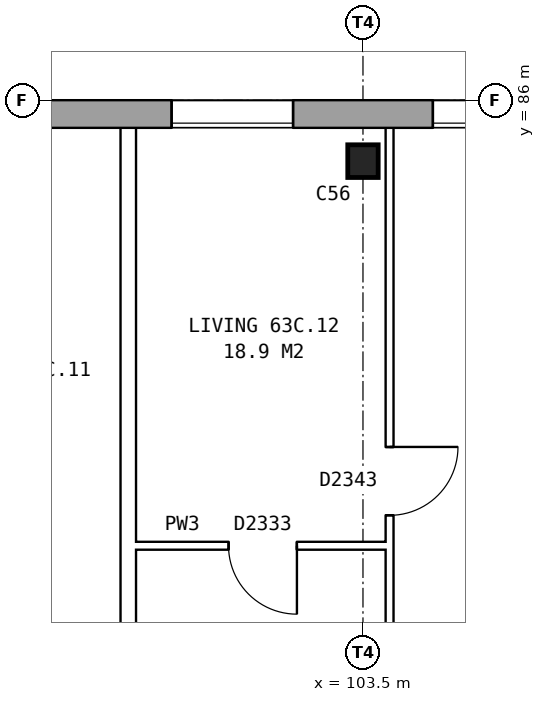
"""IFC4 building model, lengths in metres.
Left out: names, types, materials, properties, quantities, classifications, styles, units other than length and angle.
Written with IfcOpenShell. Run it as: python <this file> out.ifc"""

import sys

from ifc_helpers import new_model, si_unit, direction, frame, frame_2d, origin, origin_2d, place, context, subcontext, project, spatial, rectangle, i_section, extrude, element, fill, save


model = new_model("IFC4")
c1 = context("Model", 3, precision=1e-05, world=origin(), true_north=direction((0.0, 1.0)))
c2 = subcontext(c1, "Body", "Model", "MODEL_VIEW")
j1 = project(units=[si_unit("LENGTHUNIT", "METRE"), si_unit("PLANEANGLEUNIT", "RADIAN")], contexts=[c1])
p1 = place(None, origin())
s1 = spatial("IfcSite", under=j1, at=p1, CompositionType="ELEMENT")
p2 = place(p1, origin())
s2 = spatial("IfcBuilding", under=s1, at=p2, CompositionType="ELEMENT")
p3 = place(p2, frame((0.0, 0.0, 224.5)))
s3 = spatial("IfcBuildingStorey", under=s2, at=p3, CompositionType="ELEMENT", Elevation=224.5)
p4 = place(p3, frame((103.5, 85.2, 0.0), z_axis=(0.0, 0.0, 1.0), x_axis=(1.0, 0.0, 0.0)))
e1 = element("IfcColumn", 1, at=p4, inside=s3, PredefinedType="COLUMN", context=c2, shape_type="SweptSolid", body=[
    extrude(i_section(OverallWidth=0.4, OverallDepth=0.43, WebThickness=0.04, FlangeThickness=0.04, at=origin_2d()), origin(), (0.0, 0.0, 1.0), 2.85),
])
p5 = place(p3, frame((131.05, 85.82, 0.0), z_axis=(0.0, 0.0, 1.0), x_axis=(-1.0, 0.0, 0.0)))
e2 = element("IfcWall", 2, at=p5, inside=s3, PredefinedType="STANDARD", context=c2, shape_type="SweptSolid", body=[
    extrude(rectangle(XDim=55.1, YDim=0.36, at=frame_2d((27.55, 0.0))), origin(), (0.0, 0.0, 1.0), 2.85),
])
p6 = place(p5, frame((0.969, 0.0, 0.8)))
e3 = element("IfcOpeningElement", 3, at=p6, cuts=e2, PredefinedType="OPENING", context=c2, shape_type="SweptSolid", body=[
    extrude(rectangle(XDim=1.6, YDim=1.8, at=frame_2d((0.8, 0.9))), frame((0.0, 0.19, 0.0), z_axis=(0.0, -1.0, 0.0), x_axis=(1.0, 0.0, 0.0)), (0.0, 0.0, 1.0), 0.38),
])
p7 = place(p5, frame((4.406, 0.0, 0.8)))
e4 = element("IfcOpeningElement", 4, at=p7, cuts=e2, PredefinedType="OPENING", context=c2, shape_type="SweptSolid", body=[
    extrude(rectangle(XDim=1.6, YDim=1.8, at=frame_2d((0.8, 0.9))), frame((0.0, 0.19, 0.0), z_axis=(0.0, -1.0, 0.0), x_axis=(1.0, 0.0, 0.0)), (0.0, 0.0, 1.0), 0.38),
])
p8 = place(p5, frame((7.844, 0.0, 0.8)))
e5 = element("IfcOpeningElement", 5, at=p8, cuts=e2, PredefinedType="OPENING", context=c2, shape_type="SweptSolid", body=[
    extrude(rectangle(XDim=1.6, YDim=1.8, at=frame_2d((0.8, 0.9))), frame((0.0, 0.19, 0.0), z_axis=(0.0, -1.0, 0.0), x_axis=(1.0, 0.0, 0.0)), (0.0, 0.0, 1.0), 0.38),
])
p9 = place(p5, frame((11.281, 0.0, 0.8)))
e6 = element("IfcOpeningElement", 6, at=p9, cuts=e2, PredefinedType="OPENING", context=c2, shape_type="SweptSolid", body=[
    extrude(rectangle(XDim=1.6, YDim=1.8, at=frame_2d((0.8, 0.9))), frame((0.0, 0.19, 0.0), z_axis=(0.0, -1.0, 0.0), x_axis=(1.0, 0.0, 0.0)), (0.0, 0.0, 1.0), 0.38),
])
p10 = place(p5, frame((14.719, 0.0, 0.8)))
e7 = element("IfcOpeningElement", 7, at=p10, cuts=e2, PredefinedType="OPENING", context=c2, shape_type="SweptSolid", body=[
    extrude(rectangle(XDim=1.6, YDim=1.8, at=frame_2d((0.8, 0.9))), frame((0.0, 0.19, 0.0), z_axis=(0.0, -1.0, 0.0), x_axis=(1.0, 0.0, 0.0)), (0.0, 0.0, 1.0), 0.38),
])
p11 = place(p5, frame((18.156, 0.0, 0.8)))
e8 = element("IfcOpeningElement", 8, at=p11, cuts=e2, PredefinedType="OPENING", context=c2, shape_type="SweptSolid", body=[
    extrude(rectangle(XDim=1.6, YDim=1.8, at=frame_2d((0.8, 0.9))), frame((0.0, 0.19, 0.0), z_axis=(0.0, -1.0, 0.0), x_axis=(1.0, 0.0, 0.0)), (0.0, 0.0, 1.0), 0.38),
])
p12 = place(p5, frame((21.594, 0.0, 0.8)))
e9 = element("IfcOpeningElement", 9, at=p12, cuts=e2, PredefinedType="OPENING", context=c2, shape_type="SweptSolid", body=[
    extrude(rectangle(XDim=1.6, YDim=1.8, at=frame_2d((0.8, 0.9))), frame((0.0, 0.19, 0.0), z_axis=(0.0, -1.0, 0.0), x_axis=(1.0, 0.0, 0.0)), (0.0, 0.0, 1.0), 0.38),
])
p13 = place(p5, frame((25.031, 0.0, 0.8)))
e10 = element("IfcOpeningElement", 10, at=p13, cuts=e2, PredefinedType="OPENING", context=c2, shape_type="SweptSolid", body=[
    extrude(rectangle(XDim=1.6, YDim=1.8, at=frame_2d((0.8, 0.9))), frame((0.0, 0.19, 0.0), z_axis=(0.0, -1.0, 0.0), x_axis=(1.0, 0.0, 0.0)), (0.0, 0.0, 1.0), 0.38),
])
p14 = place(p5, frame((28.469, 0.0, 0.8)))
e11 = element("IfcOpeningElement", 11, at=p14, cuts=e2, PredefinedType="OPENING", context=c2, shape_type="SweptSolid", body=[
    extrude(rectangle(XDim=1.6, YDim=1.8, at=frame_2d((0.8, 0.9))), frame((0.0, 0.19, 0.0), z_axis=(0.0, -1.0, 0.0), x_axis=(1.0, 0.0, 0.0)), (0.0, 0.0, 1.0), 0.38),
])
p15 = place(p5, frame((31.906, 0.0, 0.8)))
e12 = element("IfcOpeningElement", 12, at=p15, cuts=e2, PredefinedType="OPENING", context=c2, shape_type="SweptSolid", body=[
    extrude(rectangle(XDim=1.6, YDim=1.8, at=frame_2d((0.8, 0.9))), frame((0.0, 0.19, 0.0), z_axis=(0.0, -1.0, 0.0), x_axis=(1.0, 0.0, 0.0)), (0.0, 0.0, 1.0), 0.38),
])
p16 = place(p5, frame((35.344, 0.0, 0.8)))
e13 = element("IfcOpeningElement", 13, at=p16, cuts=e2, PredefinedType="OPENING", context=c2, shape_type="SweptSolid", body=[
    extrude(rectangle(XDim=1.6, YDim=1.8, at=frame_2d((0.8, 0.9))), frame((0.0, 0.19, 0.0), z_axis=(0.0, -1.0, 0.0), x_axis=(1.0, 0.0, 0.0)), (0.0, 0.0, 1.0), 0.38),
])
p17 = place(p5, frame((38.781, 0.0, 0.8)))
e14 = element("IfcOpeningElement", 14, at=p17, cuts=e2, PredefinedType="OPENING", context=c2, shape_type="SweptSolid", body=[
    extrude(rectangle(XDim=1.6, YDim=1.8, at=frame_2d((0.8, 0.9))), frame((0.0, 0.19, 0.0), z_axis=(0.0, -1.0, 0.0), x_axis=(1.0, 0.0, 0.0)), (0.0, 0.0, 1.0), 0.38),
])
p18 = place(p5, frame((42.219, 0.0, 0.8)))
e15 = element("IfcOpeningElement", 15, at=p18, cuts=e2, PredefinedType="OPENING", context=c2, shape_type="SweptSolid", body=[
    extrude(rectangle(XDim=1.6, YDim=1.8, at=frame_2d((0.8, 0.9))), frame((0.0, 0.19, 0.0), z_axis=(0.0, -1.0, 0.0), x_axis=(1.0, 0.0, 0.0)), (0.0, 0.0, 1.0), 0.38),
])
p19 = place(p5, frame((45.656, 0.0, 0.8)))
e16 = element("IfcOpeningElement", 16, at=p19, cuts=e2, PredefinedType="OPENING", context=c2, shape_type="SweptSolid", body=[
    extrude(rectangle(XDim=1.6, YDim=1.8, at=frame_2d((0.8, 0.9))), frame((0.0, 0.19, 0.0), z_axis=(0.0, -1.0, 0.0), x_axis=(1.0, 0.0, 0.0)), (0.0, 0.0, 1.0), 0.38),
])
p20 = place(p5, frame((49.094, 0.0, 0.8)))
e17 = element("IfcOpeningElement", 17, at=p20, cuts=e2, PredefinedType="OPENING", context=c2, shape_type="SweptSolid", body=[
    extrude(rectangle(XDim=1.6, YDim=1.8, at=frame_2d((0.8, 0.9))), frame((0.0, 0.19, 0.0), z_axis=(0.0, -1.0, 0.0), x_axis=(1.0, 0.0, 0.0)), (0.0, 0.0, 1.0), 0.38),
])
p21 = place(p5, frame((52.531, 0.0, 0.8)))
e18 = element("IfcOpeningElement", 18, at=p21, cuts=e2, PredefinedType="OPENING", context=c2, shape_type="SweptSolid", body=[
    extrude(rectangle(XDim=1.6, YDim=1.8, at=frame_2d((0.8, 0.9))), frame((0.0, 0.19, 0.0), z_axis=(0.0, -1.0, 0.0), x_axis=(1.0, 0.0, 0.0)), (0.0, 0.0, 1.0), 0.38),
])
p22 = place(p3, frame((100.512, 80.14, 0.0), z_axis=(0.0, 0.0, 1.0), x_axis=(1.0, 0.0, 0.0)))
e19 = element("IfcWall", 19, at=p22, inside=s3, PredefinedType="PARTITIONING", context=c2, shape_type="SweptSolid", body=[
    extrude(rectangle(XDim=3.338, YDim=0.1, at=frame_2d((1.669, 0.0))), origin(), (0.0, 0.0, 1.0), 2.85),
])
p23 = place(p22, frame((1.219, 0.0, 0.0)))
e20 = element("IfcOpeningElement", 20, at=p23, cuts=e19, PredefinedType="OPENING", context=c2, shape_type="SweptSolid", body=[
    extrude(rectangle(XDim=0.9, YDim=2.1, at=frame_2d((0.45, 1.05))), frame((0.0, 0.06, 0.0), z_axis=(0.0, -1.0, 0.0), x_axis=(1.0, 0.0, 0.0)), (0.0, 0.0, 1.0), 0.12),
])
p24 = place(p3, frame((100.412, 71.3, 0.0), z_axis=(0.0, 0.0, 1.0), x_axis=(0.0, 1.0, 0.0)))
e21 = element("IfcWall", 21, at=p24, inside=s3, PredefinedType="PARTITIONING", context=c2, shape_type="SweptSolid", body=[
    extrude(rectangle(XDim=14.34, YDim=0.2, at=frame_2d((7.17, 0.0))), origin(), (0.0, 0.0, 1.0), 2.85),
])
p25 = place(p3, frame((103.85, 71.3, 0.0), z_axis=(0.0, 0.0, 1.0), x_axis=(0.0, 1.0, 0.0)))
e22 = element("IfcWall", 22, at=p25, inside=s3, PredefinedType="PARTITIONING", context=c2, shape_type="SweptSolid", body=[
    extrude(rectangle(XDim=14.34, YDim=0.1, at=frame_2d((7.17, 0.0))), origin(), (0.0, 0.0, 1.0), 2.85),
])
p26 = place(p25, frame((9.24, 0.0, 0.0)))
e23 = element("IfcOpeningElement", 23, at=p26, cuts=e22, PredefinedType="OPENING", context=c2, shape_type="SweptSolid", body=[
    extrude(rectangle(XDim=0.9, YDim=2.1, at=frame_2d((0.45, 1.05))), frame((0.0, 0.06, 0.0), z_axis=(0.0, -1.0, 0.0), x_axis=(1.0, 0.0, 0.0)), (0.0, 0.0, 1.0), 0.12),
])
p27 = place(p25, frame((0.4, 0.0, 0.0)))
e24 = element("IfcOpeningElement", 24, at=p27, cuts=e22, PredefinedType="OPENING", context=c2, shape_type="SweptSolid", body=[
    extrude(rectangle(XDim=0.9, YDim=2.1, at=frame_2d((0.45, 1.05))), frame((0.0, 0.06, 0.0), z_axis=(0.0, -1.0, 0.0), x_axis=(1.0, 0.0, 0.0)), (0.0, 0.0, 1.0), 0.12),
])
p28 = place(p13, origin())
e25 = element("IfcWindow", 25, at=p28, inside=s3, PartitioningType="SINGLE_PANEL", PredefinedType="WINDOW", context=c2, shape_type="SweptSolid", body=[
    extrude(rectangle(XDim=1.6, YDim=1.8, at=frame_2d((0.8, 0.9))), frame((0.0, 0.15, 0.0), z_axis=(0.0, -1.0, 0.0), x_axis=(1.0, 0.0, 0.0)), (0.0, 0.0, 1.0), 0.06),
])
fill(e10, e25)
p29 = place(p14, origin())
e26 = element("IfcWindow", 26, at=p29, inside=s3, PartitioningType="SINGLE_PANEL", PredefinedType="WINDOW", context=c2, shape_type="SweptSolid", body=[
    extrude(rectangle(XDim=1.6, YDim=1.8, at=frame_2d((0.8, 0.9))), frame((0.0, 0.15, 0.0), z_axis=(0.0, -1.0, 0.0), x_axis=(1.0, 0.0, 0.0)), (0.0, 0.0, 1.0), 0.06),
])
fill(e11, e26)
p30 = place(p26, frame((0.9, 0.0, 0.0), z_axis=(0.0, 0.0, 1.0), x_axis=(-1.0, 0.0, 0.0)))
e27 = element("IfcDoor", 27, at=p30, inside=s3, OperationType="SINGLE_SWING_LEFT", PredefinedType="DOOR", context=c2, shape_type="SweptSolid", body=[
    extrude(rectangle(XDim=0.9, YDim=2.1, at=frame_2d((0.45, 1.05))), frame((0.0, 0.025, 0.0), z_axis=(0.0, -1.0, 0.0), x_axis=(1.0, 0.0, 0.0)), (0.0, 0.0, 1.0), 0.05),
])
fill(e23, e27)
p31 = place(p23, frame((0.9, 0.0, 0.0), z_axis=(0.0, 0.0, 1.0), x_axis=(-1.0, 0.0, 0.0)))
e28 = element("IfcDoor", 28, at=p31, inside=s3, OperationType="SINGLE_SWING_LEFT", PredefinedType="DOOR", context=c2, shape_type="SweptSolid", body=[
    extrude(rectangle(XDim=0.9, YDim=2.1, at=frame_2d((0.45, 1.05))), frame((0.0, 0.025, 0.0), z_axis=(0.0, -1.0, 0.0), x_axis=(1.0, 0.0, 0.0)), (0.0, 0.0, 1.0), 0.05),
])
fill(e20, e28)
save(model, sys.argv[1])
